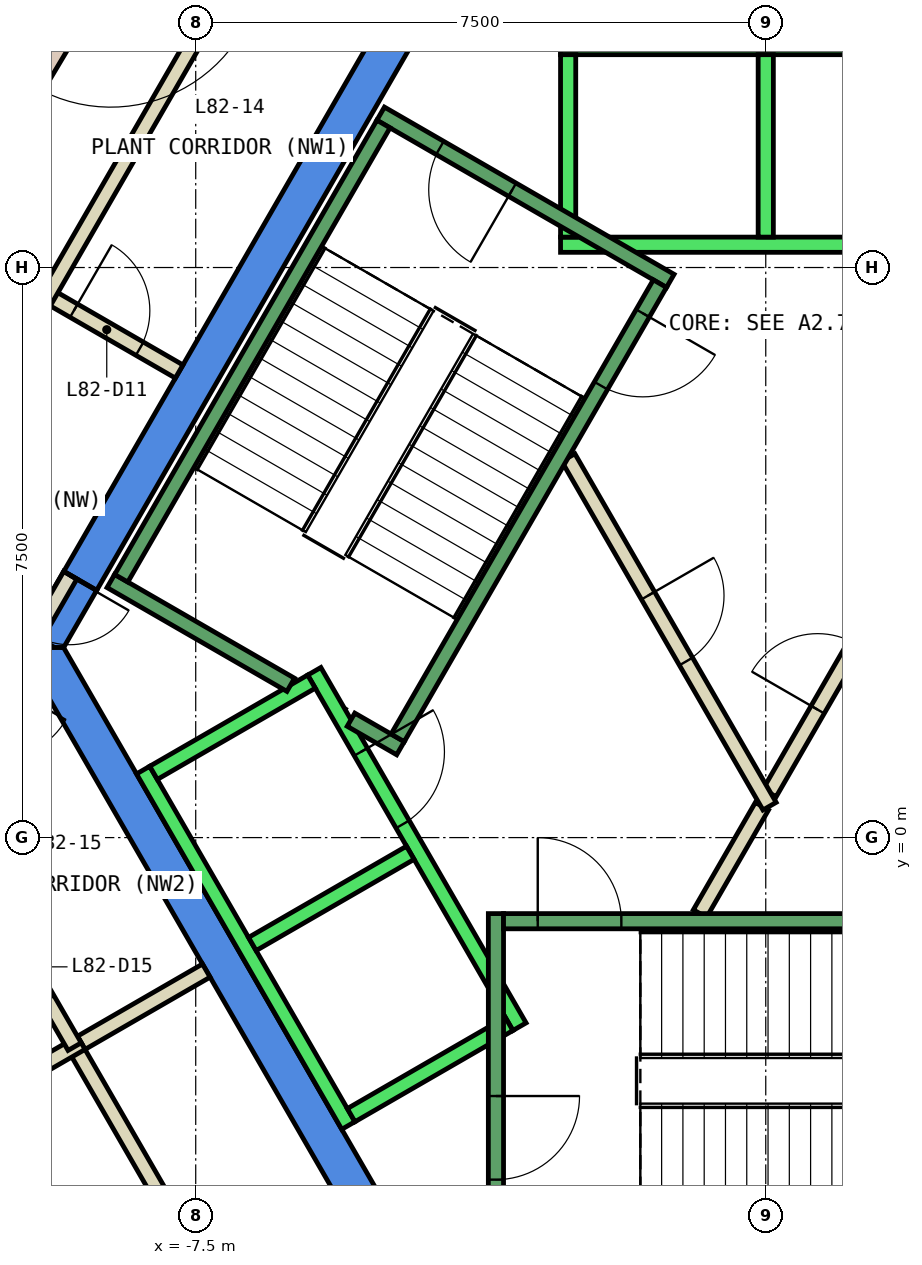
"""IFC4 building model, lengths in metres.
Left out: names, types, materials, properties, quantities, classifications, styles, units other than length and angle.
Written with IfcOpenShell. Run it as: python <this file> out.ifc"""

import sys

from ifc_helpers import new_model, si_unit, direction, frame, frame_2d, origin, place, context, subcontext, project, spatial, polyline, rectangle, outline, extrude, element, fill, save


model = new_model("IFC4")
c1 = context("Model", 3, precision=1e-05, world=origin(), true_north=direction((0.0, 1.0)))
c2 = subcontext(c1, "Body", "Model", "MODEL_VIEW")
j1 = project(units=[si_unit("LENGTHUNIT", "METRE"), si_unit("PLANEANGLEUNIT", "RADIAN")], contexts=[c1])
p1 = place(None, origin())
s1 = spatial("IfcSite", under=j1, at=p1, CompositionType="ELEMENT")
p2 = place(p1, origin())
s2 = spatial("IfcBuilding", under=s1, at=p2, CompositionType="ELEMENT")
p3 = place(p2, frame((0.0, 0.0, 349.4)))
s3 = spatial("IfcBuildingStorey", under=s2, at=p3, CompositionType="ELEMENT", Elevation=349.4)
p4 = place(p3, frame((0.0, 0.0, -0.45)))
e1 = element("IfcWall", 1, at=p4, inside=s3, PredefinedType="SHEAR", context=c2, shape_type="SweptSolid", body=[
    extrude(outline(polyline([(-9.236, 3.502), (-8.803, 3.253), (-4.619, 10.5), (-4.907, 11.0), (-9.236, 3.502)])), origin(), (0.0, 0.0, 1.0), 4.6),
])
p5 = place(p3, frame((0.0, 0.0, 3.6)))
e2 = element("IfcWall", 2, at=p5, inside=s3, PredefinedType="SHEAR", context=c2, shape_type="SweptSolid", body=[
    extrude(outline(polyline([(-9.7, 2.7), (-9.354, 2.5), (-9.238, 2.5), (-8.803, 3.253), (-9.236, 3.502), (-9.7, 2.7)])), origin(), (0.0, 0.0, 1.0), 0.55),
])
p6 = place(p3, frame((0.0, 0.0, -0.45)))
e3 = element("IfcWall", 3, at=p6, inside=s3, PredefinedType="SHEAR", context=c2, shape_type="SweptSolid", body=[
    extrude(outline(polyline([(-9.815, 2.5), (-4.907, -6.0), (-4.619, -5.5), (-9.238, 2.5), (-9.815, 2.5)])), origin(), (0.0, 0.0, 1.0), 4.6),
])
p7 = place(p3, frame((-8.406, 11.966, 0.0), z_axis=(0.0, 0.0, 1.0), x_axis=(-0.512115331419, -0.858916694055, 0.0)))
e4 = element("IfcWall", 4, at=p7, inside=s3, PredefinedType="STANDARD", context=c2, shape_type="SweptSolid", body=[
    extrude(rectangle(XDim=5.661, YDim=0.3, at=frame_2d((2.83, 0.0))), origin(), (0.0, 0.0, 1.0), 4.15),
])
p8 = place(p7, frame((0.415, 0.0, 0.0)))
e5 = element("IfcOpeningElement", 5, at=p8, cuts=e4, PredefinedType="OPENING", context=c2, shape_type="SweptSolid", body=[
    extrude(rectangle(XDim=2.0, YDim=2.4, at=frame_2d((1.0, 1.2))), frame((0.0, 0.16, 0.0), z_axis=(0.0, -1.0, 0.0), x_axis=(1.0, 0.0, 0.0)), (0.0, 0.0, 1.0), 0.32),
])
p9 = place(p7, frame((3.546, 0.0, 0.9)))
e6 = element("IfcOpeningElement", 6, at=p9, cuts=e4, PredefinedType="OPENING", context=c2, shape_type="SweptSolid", body=[
    extrude(rectangle(XDim=1.4, YDim=3.0, at=frame_2d((0.7, 1.5))), frame((0.0, 0.16, 0.0), z_axis=(0.0, -1.0, 0.0), x_axis=(1.0, 0.0, 0.0)), (0.0, 0.0, 1.0), 0.32),
])
p10 = place(p3, origin())
e7 = element("IfcWall", 7, at=p10, inside=s3, PredefinedType="PARAPET", context=c2, shape_type="SweptSolid", body=[
    extrude(outline(polyline([(-9.22, 13.846), (-12.99, 7.5), (-12.73, 7.35), (-8.964, 13.69), (-9.22, 13.846)])), origin(), (0.0, 0.0, 1.0), 1.1),
])
p11 = place(p3, frame((-0.866, -1.0, 0.0), z_axis=(0.0, 0.0, 1.0), x_axis=(0.500033287521, 0.866006184372, 0.0)))
e8 = element("IfcWall", 8, at=p11, inside=s3, PredefinedType="PARTITIONING", context=c2, shape_type="SweptSolid", body=[
    extrude(rectangle(XDim=1.632, YDim=0.2, at=frame_2d((0.816, 0.0))), origin(), (0.0, 0.0, 1.0), 4.15),
])
p12 = place(p3, frame((0.05, 0.587, 0.0), z_axis=(0.0, 0.0, 1.0), x_axis=(0.500028932171, 0.866008699143, 0.0)))
e9 = element("IfcWall", 9, at=p12, inside=s3, PredefinedType="PARTITIONING", context=c2, shape_type="SweptSolid", body=[
    extrude(rectangle(XDim=3.632, YDim=0.2, at=frame_2d((1.816, 0.0))), origin(), (0.0, 0.0, 1.0), 4.15),
])
p13 = place(p12, frame((1.266, 0.0, 0.0)))
e10 = element("IfcOpeningElement", 10, at=p13, cuts=e9, PredefinedType="OPENING", context=c2, shape_type="SweptSolid", body=[
    extrude(rectangle(XDim=1.0, YDim=2.1, at=frame_2d((0.5, 1.05))), frame((0.0, 0.11, 0.0), z_axis=(0.0, -1.0, 0.0), x_axis=(1.0, 0.0, 0.0)), (0.0, 0.0, 1.0), 0.22),
])
p14 = place(p3, frame((-2.598, 5.0, 0.0), z_axis=(0.0, 0.0, 1.0), x_axis=(0.49995654735, -0.86605048973, 0.0)))
e11 = element("IfcWall", 11, at=p14, inside=s3, PredefinedType="PARTITIONING", context=c2, shape_type="SweptSolid", body=[
    extrude(rectangle(XDim=5.296, YDim=0.2, at=frame_2d((2.648, 0.0))), origin(), (0.0, 0.0, 1.0), 4.15),
])
p15 = place(p14, frame((2.098, 0.0, 0.0)))
e12 = element("IfcOpeningElement", 12, at=p15, cuts=e11, PredefinedType="OPENING", context=c2, shape_type="SweptSolid", body=[
    extrude(rectangle(XDim=1.0, YDim=2.1, at=frame_2d((0.5, 1.05))), frame((0.0, 0.11, 0.0), z_axis=(0.0, -1.0, 0.0), x_axis=(1.0, 0.0, 0.0)), (0.0, 0.0, 1.0), 0.22),
])
p16 = place(p3, frame((-6.112, -7.913, 0.0), z_axis=(0.0, 0.0, 1.0), x_axis=(-0.500006035293, 0.866021919278, 0.0)))
e13 = element("IfcWall", 13, at=p16, inside=s3, PredefinedType="PARTITIONING", context=c2, shape_type="SweptSolid", body=[
    extrude(rectangle(XDim=5.962, YDim=0.2, at=frame_2d((2.981, 0.0))), origin(), (0.0, 0.0, 1.0), 4.15),
])
p17 = place(p3, frame((-9.006, -2.7, 0.0), z_axis=(0.0, 0.0, 1.0), x_axis=(0.865980106173, 0.500078449558, 0.0)))
e14 = element("IfcWall", 14, at=p17, inside=s3, PredefinedType="PARTITIONING", context=c2, shape_type="SweptSolid", body=[
    extrude(rectangle(XDim=1.9, YDim=0.2, at=frame_2d((0.95, 0.0))), origin(), (0.0, 0.0, 1.0), 4.15),
])
p18 = place(p3, frame((-17.647, -7.689, 0.0), z_axis=(0.0, 0.0, 1.0), x_axis=(0.866016483303, 0.500015450408, 0.0)))
e15 = element("IfcWall", 15, at=p18, inside=s3, PredefinedType="PARTITIONING", context=c2, shape_type="SweptSolid", body=[
    extrude(rectangle(XDim=9.978, YDim=0.2, at=frame_2d((4.989, 0.0))), origin(), (0.0, 0.0, 1.0), 4.15),
])
p19 = place(p3, frame((-9.45, 7.132, 0.0), z_axis=(0.0, 0.0, 1.0), x_axis=(0.866010750942, -0.50002537861, 0.0)))
e16 = element("IfcWall", 16, at=p19, inside=s3, PredefinedType="PARTITIONING", context=c2, shape_type="SweptSolid", body=[
    extrude(rectangle(XDim=2.0, YDim=0.2, at=frame_2d((1.0, 0.0))), origin(), (0.0, 0.0, 1.0), 4.15),
])
p20 = place(p19, frame((0.4, 0.0, 0.0)))
e17 = element("IfcOpeningElement", 17, at=p20, cuts=e16, PredefinedType="OPENING", context=c2, shape_type="SweptSolid", body=[
    extrude(rectangle(XDim=1.0, YDim=2.1, at=frame_2d((0.5, 1.05))), frame((0.0, 0.11, 0.0), z_axis=(0.0, -1.0, 0.0), x_axis=(1.0, 0.0, 0.0)), (0.0, 0.0, 1.0), 0.22),
])
p21 = place(p3, frame((-9.5, 7.045, 0.0), z_axis=(0.0, 0.0, 1.0), x_axis=(0.499966812698, 0.866044563634, 0.0)))
e18 = element("IfcWall", 18, at=p21, inside=s3, PredefinedType="PARTITIONING", context=c2, shape_type="SweptSolid", body=[
    extrude(rectangle(XDim=6.977, YDim=0.2, at=frame_2d((3.488, 0.0))), origin(), (0.0, 0.0, 1.0), 4.15),
])
p22 = place(p3, frame((-9.093, -2.75, 0.0), z_axis=(0.0, 0.0, 1.0), x_axis=(-0.50016517285, 0.865930020191, 0.0)))
e19 = element("IfcWall", 19, at=p22, inside=s3, PredefinedType="PARTITIONING", context=c2, shape_type="SweptSolid", body=[
    extrude(rectangle(XDim=2.641, YDim=0.2, at=frame_2d((1.321, 0.0))), origin(), (0.0, 0.0, 1.0), 4.15),
])
p23 = place(p22, frame((0.712, 0.0, 0.0)))
e20 = element("IfcOpeningElement", 20, at=p23, cuts=e19, PredefinedType="OPENING", context=c2, shape_type="SweptSolid", body=[
    extrude(rectangle(XDim=1.0, YDim=2.1, at=frame_2d((0.5, 1.05))), frame((0.0, 0.11, 0.0), z_axis=(0.0, -1.0, 0.0), x_axis=(1.0, 0.0, 0.0)), (0.0, 0.0, 1.0), 0.22),
])
p24 = place(p3, frame((-9.15, 3.452, 0.0), z_axis=(0.0, 0.0, 1.0), x_axis=(-0.500079945886, -0.865979242085, 0.0)))
e21 = element("IfcWall", 21, at=p24, inside=s3, PredefinedType="PARTITIONING", context=c2, shape_type="SweptSolid", body=[
    extrude(rectangle(XDim=0.926, YDim=0.2, at=frame_2d((0.463, 0.0))), origin(), (0.0, 0.0, 1.0), 2.4),
])
p25 = place(p24, frame((0.017, 0.0, 0.0)))
e22 = element("IfcOpeningElement", 22, at=p25, cuts=e21, PredefinedType="OPENING", context=c2, shape_type="SweptSolid", body=[
    extrude(rectangle(XDim=0.9, YDim=2.1, at=frame_2d((0.45, 1.05))), frame((0.0, 0.11, 0.0), z_axis=(0.0, -1.0, 0.0), x_axis=(1.0, 0.0, 0.0)), (0.0, 0.0, 1.0), 0.22),
])
for number, where, z_axis, x_axis in (
    (23, (2.7, 7.8, 0.0), (0.0, 0.0, 1.0), (-1.0, 0.0, 0.0)),
    (24, (2.7, 10.4, 0.0), (0.0, 0.0, 1.0), (-1.0, 0.0, 0.0)),
):
    element("IfcWall", number, at=place(p3, frame(where, z_axis=z_axis, x_axis=x_axis)), inside=s3, PredefinedType="STANDARD", context=c2, shape_type="SweptSolid", body=[
        extrude(rectangle(XDim=5.4, YDim=0.2, at=frame_2d((2.7, 0.0))), origin(), (0.0, 0.0, 1.0), 4.15),
    ])
for number, where, z_axis, x_axis in (
    (25, (0.0, 7.9, 0.0), (0.0, 0.0, 1.0), (0.0, 1.0, 0.0)),
    (26, (-2.6, 7.9, 0.0), (0.0, 0.0, 1.0), (0.0, 1.0, 0.0)),
):
    element("IfcWall", number, at=place(p3, frame(where, z_axis=z_axis, x_axis=x_axis)), inside=s3, PredefinedType="STANDARD", context=c2, shape_type="SweptSolid", body=[
        extrude(rectangle(XDim=2.4, YDim=0.2, at=frame_2d((1.2, 0.0))), origin(), (0.0, 0.0, 1.0), 4.15),
    ])
p26 = place(p3, frame((-5.94, 2.188, 0.0), z_axis=(0.0, 0.0, 1.0), x_axis=(0.500034260056, -0.866005622828, 0.0)))
e27 = element("IfcWall", 27, at=p26, inside=s3, PredefinedType="STANDARD", context=c2, shape_type="SweptSolid", body=[
    extrude(rectangle(XDim=5.399, YDim=0.2, at=frame_2d((2.7, 0.0))), origin(), (0.0, 0.0, 1.0), 4.15),
])
p27 = place(p26, frame((1.225, 0.0, 0.0)))
e28 = element("IfcOpeningElement", 28, at=p27, cuts=e27, PredefinedType="OPENING", context=c2, shape_type="SweptSolid", body=[
    extrude(rectangle(XDim=1.1, YDim=2.1, at=frame_2d((0.55, 1.05))), frame((0.0, 0.11, 0.0), z_axis=(0.0, -1.0, 0.0), x_axis=(1.0, 0.0, 0.0)), (0.0, 0.0, 1.0), 0.22),
])
p28 = place(p3, frame((-8.192, 0.888, 0.0), z_axis=(0.0, 0.0, 1.0), x_axis=(0.500034260056, -0.866005622828, 0.0)))
e29 = element("IfcWall", 29, at=p28, inside=s3, PredefinedType="STANDARD", context=c2, shape_type="SweptSolid", body=[
    extrude(rectangle(XDim=5.399, YDim=0.2, at=frame_2d((2.7, 0.0))), origin(), (0.0, 0.0, 1.0), 4.15),
])
for number, where, z_axis, x_axis in (
    (30, (-5.977, 2.052, 0.0), (0.0, 0.0, 1.0), (-0.866, -0.5, 0.0)),
    (31, (-4.677, -0.2, 0.0), (0.0, 0.0, 1.0), (-0.866, -0.5, 0.0)),
):
    element("IfcWall", number, at=place(p3, frame(where, z_axis=z_axis, x_axis=x_axis)), inside=s3, PredefinedType="STANDARD", context=c2, shape_type="SweptSolid", body=[
        extrude(rectangle(XDim=2.399, YDim=0.2, at=frame_2d((1.2, 0.0))), origin(), (0.0, 0.0, 1.0), 4.15),
    ])
p29 = place(p3, frame((-3.377, -2.452, 0.0), z_axis=(0.0, 0.0, 1.0), x_axis=(-0.865955154139, -0.50012165622, 0.0)))
e32 = element("IfcWall", 32, at=p29, inside=s3, PredefinedType="STANDARD", context=c2, shape_type="SweptSolid", body=[
    extrude(rectangle(XDim=2.4, YDim=0.2, at=frame_2d((1.2, 0.0))), origin(), (0.0, 0.0, 1.0), 4.15),
])
p30 = place(p3, frame((-3.55, -1.0, 0.0), z_axis=(0.0, 0.0, 1.0), x_axis=(0.0, -1.0, 0.0)))
e33 = element("IfcWall", 33, at=p30, inside=s3, PredefinedType="STANDARD", context=c2, shape_type="SweptSolid", body=[
    extrude(rectangle(XDim=4.4, YDim=0.2, at=frame_2d((2.2, 0.0))), origin(), (0.0, 0.0, 1.0), 4.15),
])
p31 = place(p30, frame((2.4, 0.0, 0.0)))
e34 = element("IfcOpeningElement", 34, at=p31, cuts=e33, PredefinedType="OPENING", context=c2, shape_type="SweptSolid", body=[
    extrude(rectangle(XDim=1.1, YDim=2.2, at=frame_2d((0.55, 1.1))), frame((0.0, 0.11, 0.0), z_axis=(0.0, -1.0, 0.0), x_axis=(1.0, 0.0, 0.0)), (0.0, 0.0, 1.0), 0.22),
])
p32 = place(p3, frame((-3.45, -1.1, 0.0), z_axis=(0.0, 0.0, 1.0), x_axis=(1.0, 0.0, 0.0)))
e35 = element("IfcWall", 35, at=p32, inside=s3, PredefinedType="STANDARD", context=c2, shape_type="SweptSolid", body=[
    extrude(rectangle(XDim=6.9, YDim=0.2, at=frame_2d((3.45, 0.0))), origin(), (0.0, 0.0, 1.0), 4.15),
])
p33 = place(p32, frame((0.45, 0.0, 0.0)))
e36 = element("IfcOpeningElement", 36, at=p33, cuts=e35, PredefinedType="OPENING", context=c2, shape_type="SweptSolid", body=[
    extrude(rectangle(XDim=1.1, YDim=2.2, at=frame_2d((0.55, 1.1))), frame((0.0, 0.11, 0.0), z_axis=(0.0, -1.0, 0.0), x_axis=(1.0, 0.0, 0.0)), (0.0, 0.0, 1.0), 0.22),
])
p34 = place(p3, frame((-1.256, 7.324, 0.0), z_axis=(0.0, 0.0, 1.0), x_axis=(-0.866046073146, 0.499964197906, 0.0)))
e37 = element("IfcWall", 37, at=p34, inside=s3, PredefinedType="STANDARD", context=c2, shape_type="SweptSolid", body=[
    extrude(rectangle(XDim=4.4, YDim=0.2, at=frame_2d((2.2, 0.0))), origin(), (0.0, 0.0, 1.0), 4.15),
])
p35 = place(p34, frame((2.4, 0.0, 0.0)))
e38 = element("IfcOpeningElement", 38, at=p35, cuts=e37, PredefinedType="OPENING", context=c2, shape_type="SweptSolid", body=[
    extrude(rectangle(XDim=1.1, YDim=2.2, at=frame_2d((0.55, 1.1))), frame((0.0, 0.11, 0.0), z_axis=(0.0, -1.0, 0.0), x_axis=(1.0, 0.0, 0.0)), (0.0, 0.0, 1.0), 0.22),
])
p36 = place(p3, frame((-6.25, 2.01, 0.0), z_axis=(0.0, 0.0, 1.0), x_axis=(-0.86611865017, 0.499838457731, 0.0)))
e39 = element("IfcWall", 39, at=p36, inside=s3, PredefinedType="STANDARD", context=c2, shape_type="SweptSolid", body=[
    extrude(rectangle(XDim=2.733, YDim=0.2, at=frame_2d((1.366, 0.0))), origin(), (0.0, 0.0, 1.0), 4.15),
])
p37 = place(p3, frame((-4.806, 1.176, 0.0), z_axis=(0.0, 0.0, 1.0), x_axis=(-0.866558586415, 0.499075361355, 0.0)))
e40 = element("IfcWall", 40, at=p37, inside=s3, PredefinedType="STANDARD", context=c2, shape_type="SweptSolid", body=[
    extrude(rectangle(XDim=0.751, YDim=0.2, at=frame_2d((0.376, 0.0))), origin(), (0.0, 0.0, 1.0), 4.15),
])
p38 = place(p3, frame((-1.393, 7.288, 0.0), z_axis=(0.0, 0.0, 1.0), x_axis=(-0.499963383562, -0.866046543262, 0.0)))
e41 = element("IfcWall", 41, at=p38, inside=s3, PredefinedType="STANDARD", context=c2, shape_type="SweptSolid", body=[
    extrude(rectangle(XDim=6.9, YDim=0.2, at=frame_2d((3.45, 0.0))), origin(), (0.0, 0.0, 1.0), 4.15),
])
p39 = place(p38, frame((0.45, 0.0, 0.0)))
e42 = element("IfcOpeningElement", 42, at=p39, cuts=e41, PredefinedType="OPENING", context=c2, shape_type="SweptSolid", body=[
    extrude(rectangle(XDim=1.1, YDim=2.2, at=frame_2d((0.55, 1.1))), frame((0.0, 0.11, 0.0), z_axis=(0.0, -1.0, 0.0), x_axis=(1.0, 0.0, 0.0)), (0.0, 0.0, 1.0), 0.22),
])
p40 = place(p3, frame((-5.03, 9.388, 0.0), z_axis=(0.0, 0.0, 1.0), x_axis=(-0.499978703459, -0.866037698999, 0.0)))
e43 = element("IfcWall", 43, at=p40, inside=s3, PredefinedType="STANDARD", context=c2, shape_type="SweptSolid", body=[
    extrude(rectangle(XDim=6.9, YDim=0.2, at=frame_2d((3.45, 0.0))), origin(), (0.0, 0.0, 1.0), 4.15),
])
p41 = place(p8, origin())
e44 = element("IfcDoor", 44, at=p41, inside=s3, OperationType="SLIDING_TO_LEFT", PredefinedType="DOOR", context=c2, shape_type="SweptSolid", body=[
    extrude(rectangle(XDim=2.0, YDim=2.4, at=frame_2d((1.0, 1.2))), frame((0.0, 0.025, 0.0), z_axis=(0.0, -1.0, 0.0), x_axis=(1.0, 0.0, 0.0)), (0.0, 0.0, 1.0), 0.05),
])
fill(e5, e44)
p42 = place(p20, origin())
e45 = element("IfcDoor", 45, at=p42, inside=s3, OperationType="SINGLE_SWING_LEFT", PredefinedType="DOOR", context=c2, shape_type="SweptSolid", body=[
    extrude(rectangle(XDim=1.0, YDim=2.1, at=frame_2d((0.5, 1.05))), frame((0.0, 0.025, 0.0), z_axis=(0.0, -1.0, 0.0), x_axis=(1.0, 0.0, 0.0)), (0.0, 0.0, 1.0), 0.05),
])
fill(e17, e45)
p43 = place(p13, origin())
e46 = element("IfcDoor", 46, at=p43, inside=s3, OperationType="SINGLE_SWING_RIGHT", PredefinedType="DOOR", context=c2, shape_type="SweptSolid", body=[
    extrude(rectangle(XDim=1.0, YDim=2.1, at=frame_2d((0.5, 1.05))), frame((0.0, 0.025, 0.0), z_axis=(0.0, -1.0, 0.0), x_axis=(1.0, 0.0, 0.0)), (0.0, 0.0, 1.0), 0.05),
])
fill(e10, e46)
p44 = place(p15, origin())
e47 = element("IfcDoor", 47, at=p44, inside=s3, OperationType="SINGLE_SWING_RIGHT", PredefinedType="DOOR", context=c2, shape_type="SweptSolid", body=[
    extrude(rectangle(XDim=1.0, YDim=2.1, at=frame_2d((0.5, 1.05))), frame((0.0, 0.025, 0.0), z_axis=(0.0, -1.0, 0.0), x_axis=(1.0, 0.0, 0.0)), (0.0, 0.0, 1.0), 0.05),
])
fill(e12, e47)
p45 = place(p25, origin())
e48 = element("IfcDoor", 48, at=p45, inside=s3, OperationType="SINGLE_SWING_LEFT", PredefinedType="DOOR", context=c2, shape_type="SweptSolid", body=[
    extrude(rectangle(XDim=0.9, YDim=2.1, at=frame_2d((0.45, 1.05))), frame((0.0, 0.025, 0.0), z_axis=(0.0, -1.0, 0.0), x_axis=(1.0, 0.0, 0.0)), (0.0, 0.0, 1.0), 0.05),
])
fill(e22, e48)
p46 = place(p27, origin())
e49 = element("IfcDoor", 49, at=p46, inside=s3, OperationType="SLIDING_TO_LEFT", PredefinedType="DOOR", context=c2, shape_type="SweptSolid", body=[
    extrude(rectangle(XDim=1.1, YDim=2.1, at=frame_2d((0.55, 1.05))), frame((0.0, 0.025, 0.0), z_axis=(0.0, -1.0, 0.0), x_axis=(1.0, 0.0, 0.0)), (0.0, 0.0, 1.0), 0.05),
])
fill(e28, e49)
p47 = place(p33, origin())
e50 = element("IfcDoor", 50, at=p47, inside=s3, OperationType="SINGLE_SWING_LEFT", PredefinedType="DOOR", context=c2, shape_type="SweptSolid", body=[
    extrude(rectangle(XDim=1.1, YDim=2.2, at=frame_2d((0.55, 1.1))), frame((0.0, 0.025, 0.0), z_axis=(0.0, -1.0, 0.0), x_axis=(1.0, 0.0, 0.0)), (0.0, 0.0, 1.0), 0.05),
])
fill(e36, e50)
p48 = place(p31, origin())
e51 = element("IfcDoor", 51, at=p48, inside=s3, OperationType="SINGLE_SWING_LEFT", PredefinedType="DOOR", context=c2, shape_type="SweptSolid", body=[
    extrude(rectangle(XDim=1.1, YDim=2.2, at=frame_2d((0.55, 1.1))), frame((0.0, 0.025, 0.0), z_axis=(0.0, -1.0, 0.0), x_axis=(1.0, 0.0, 0.0)), (0.0, 0.0, 1.0), 0.05),
])
fill(e34, e51)
p49 = place(p39, origin())
e52 = element("IfcDoor", 52, at=p49, inside=s3, OperationType="SINGLE_SWING_LEFT", PredefinedType="DOOR", context=c2, shape_type="SweptSolid", body=[
    extrude(rectangle(XDim=1.1, YDim=2.2, at=frame_2d((0.55, 1.1))), frame((0.0, 0.025, 0.0), z_axis=(0.0, -1.0, 0.0), x_axis=(1.0, 0.0, 0.0)), (0.0, 0.0, 1.0), 0.05),
])
fill(e42, e52)
p50 = place(p35, origin())
e53 = element("IfcDoor", 53, at=p50, inside=s3, OperationType="SINGLE_SWING_LEFT", PredefinedType="DOOR", context=c2, shape_type="SweptSolid", body=[
    extrude(rectangle(XDim=1.1, YDim=2.2, at=frame_2d((0.55, 1.1))), frame((0.0, 0.025, 0.0), z_axis=(0.0, -1.0, 0.0), x_axis=(1.0, 0.0, 0.0)), (0.0, 0.0, 1.0), 0.05),
])
fill(e38, e53)
save(model, sys.argv[1])
